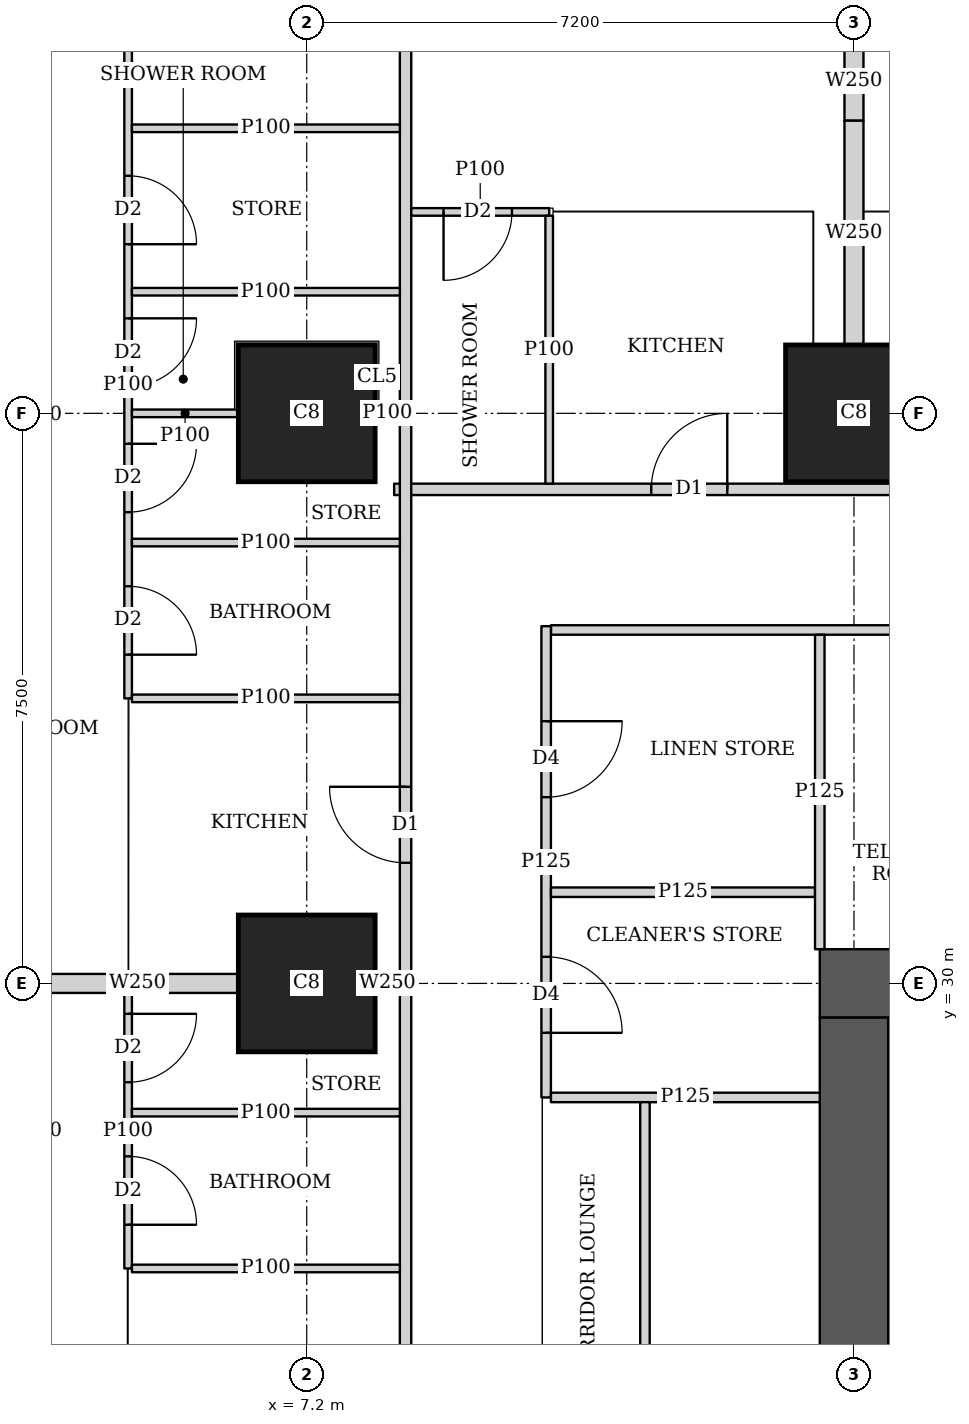
"""IFC4 building model, lengths in metres.
Left out: names, types, materials, properties, quantities, classifications, styles, units other than length and angle.
Written with IfcOpenShell. Run it as: python <this file> out.ifc"""

import sys

from ifc_helpers import new_model, si_unit, direction, frame, frame_2d, origin, origin_2d, place, context, subcontext, project, spatial, rectangle, extrude, element, fill, save


model = new_model("IFC4")
c1 = context("Model", 3, precision=1e-05, world=origin(), true_north=direction((0.0, 1.0)))
c2 = subcontext(c1, "Body", "Model", "MODEL_VIEW")
j1 = project(units=[si_unit("LENGTHUNIT", "METRE"), si_unit("PLANEANGLEUNIT", "RADIAN")], contexts=[c1])
p1 = place(None, origin())
s1 = spatial("IfcSite", under=j1, at=p1, CompositionType="ELEMENT")
p2 = place(p1, origin())
s2 = spatial("IfcBuilding", under=s1, at=p2, CompositionType="ELEMENT")
p3 = place(p2, frame((0.0, 0.0, 42.5)))
s3 = spatial("IfcBuildingStorey", under=s2, at=p3, CompositionType="ELEMENT", Elevation=42.5)
for number, where, z_axis, x_axis in (
    (1, (7.2, 30.0, 0.0), (0.0, 0.0, 1.0), (1.0, 0.0, 0.0)),
    (2, (7.2, 37.5, 0.0), (0.0, 0.0, 1.0), (1.0, 0.0, 0.0)),
    (3, (14.4, 37.5, 0.0), (0.0, 0.0, 1.0), (1.0, 0.0, 0.0)),
):
    element("IfcColumn", number, at=place(p3, frame(where, z_axis=z_axis, x_axis=x_axis)), inside=s3, PredefinedType="COLUMN", context=c2, shape_type="SweptSolid", body=[
        extrude(rectangle(XDim=1.8, YDim=1.8, at=origin_2d()), origin(), (0.0, 0.0, 1.0), 3.75),
    ])
p4 = place(p3, frame((13.95, 30.0, 0.0), z_axis=(0.0, 0.0, 1.0), x_axis=(1.0, 0.0, 0.0)))
e4 = element("IfcWall", 4, at=p4, inside=s3, PredefinedType="SHEAR", context=c2, shape_type="SweptSolid", body=[
    extrude(rectangle(XDim=15.3, YDim=0.9, at=frame_2d((7.65, 0.0))), origin(), (0.0, 0.0, 1.0), 3.75),
])
p5 = place(p4, frame((4.45, 0.0, 0.0)))
e5 = element("IfcOpeningElement", 5, at=p5, cuts=e4, PredefinedType="OPENING", context=c2, shape_type="SweptSolid", body=[
    extrude(rectangle(XDim=1.8, YDim=2.1, at=frame_2d((0.9, 1.05))), frame((0.0, 0.46, 0.0), z_axis=(0.0, -1.0, 0.0), x_axis=(1.0, 0.0, 0.0)), (0.0, 0.0, 1.0), 0.92),
])
p6 = place(p4, frame((10.7, 0.0, 0.0)))
e6 = element("IfcOpeningElement", 6, at=p6, cuts=e4, PredefinedType="OPENING", context=c2, shape_type="SweptSolid", body=[
    extrude(rectangle(XDim=1.1, YDim=2.1, at=frame_2d((0.55, 1.05))), frame((0.0, 0.46, 0.0), z_axis=(0.0, -1.0, 0.0), x_axis=(1.0, 0.0, 0.0)), (0.0, 0.0, 1.0), 0.92),
])
p7 = place(p3, frame((14.4, 15.45, 0.0), z_axis=(0.0, 0.0, 1.0), x_axis=(0.0, 1.0, 0.0)))
e7 = element("IfcWall", 7, at=p7, inside=s3, PredefinedType="SHEAR", context=c2, shape_type="SweptSolid", body=[
    extrude(rectangle(XDim=14.1, YDim=0.9, at=frame_2d((7.05, 0.0))), origin(), (0.0, 0.0, 1.0), 3.75),
])
p8 = place(p3, frame((8.5, 2.426, 0.0), z_axis=(0.0, 0.0, 1.0), x_axis=(0.0, 1.0, 0.0)))
e8 = element("IfcWall", 8, at=p8, inside=s3, PredefinedType="SOLIDWALL", context=c2, shape_type="SweptSolid", body=[
    extrude(rectangle(XDim=40.173, YDim=0.15, at=frame_2d((20.086, 0.0))), origin(), (0.0, 0.0, 1.0), 3.5),
])
p9 = place(p8, frame((9.986, 0.0, 0.0)))
e9 = element("IfcOpeningElement", 9, at=p9, cuts=e8, PredefinedType="OPENING", context=c2, shape_type="SweptSolid", body=[
    extrude(rectangle(XDim=1.0, YDim=2.1, at=frame_2d((0.5, 1.05))), frame((0.0, 0.085, 0.0), z_axis=(0.0, -1.0, 0.0), x_axis=(1.0, 0.0, 0.0)), (0.0, 0.0, 1.0), 0.17),
])
p10 = place(p8, frame((14.161, 0.0, 0.0)))
e10 = element("IfcOpeningElement", 10, at=p10, cuts=e8, PredefinedType="OPENING", context=c2, shape_type="SweptSolid", body=[
    extrude(rectangle(XDim=1.0, YDim=2.1, at=frame_2d((0.5, 1.05))), frame((0.0, 0.085, 0.0), z_axis=(0.0, -1.0, 0.0), x_axis=(1.0, 0.0, 0.0)), (0.0, 0.0, 1.0), 0.17),
])
p11 = place(p8, frame((21.662, 0.0, 0.0)))
e11 = element("IfcOpeningElement", 11, at=p11, cuts=e8, PredefinedType="OPENING", context=c2, shape_type="SweptSolid", body=[
    extrude(rectangle(XDim=1.0, YDim=2.1, at=frame_2d((0.5, 1.05))), frame((0.0, 0.085, 0.0), z_axis=(0.0, -1.0, 0.0), x_axis=(1.0, 0.0, 0.0)), (0.0, 0.0, 1.0), 0.17),
])
p12 = place(p8, frame((29.161, 0.0, 0.0)))
e12 = element("IfcOpeningElement", 12, at=p12, cuts=e8, PredefinedType="OPENING", context=c2, shape_type="SweptSolid", body=[
    extrude(rectangle(XDim=1.0, YDim=2.1, at=frame_2d((0.5, 1.05))), frame((0.0, 0.085, 0.0), z_axis=(0.0, -1.0, 0.0), x_axis=(1.0, 0.0, 0.0)), (0.0, 0.0, 1.0), 0.17),
])
p13 = place(p3, frame((8.35, 36.5, 0.0), z_axis=(0.0, 0.0, 1.0), x_axis=(1.0, 0.0, 0.0)))
e13 = element("IfcWall", 13, at=p13, inside=s3, PredefinedType="SOLIDWALL", context=c2, shape_type="SweptSolid", body=[
    extrude(rectangle(XDim=26.415, YDim=0.15, at=frame_2d((13.208, 0.0))), origin(), (0.0, 0.0, 1.0), 3.5),
])
p14 = place(p13, frame((3.383, 0.0, 0.0)))
e14 = element("IfcOpeningElement", 14, at=p14, cuts=e13, PredefinedType="OPENING", context=c2, shape_type="SweptSolid", body=[
    extrude(rectangle(XDim=1.0, YDim=2.1, at=frame_2d((0.5, 1.05))), frame((0.0, 0.085, 0.0), z_axis=(0.0, -1.0, 0.0), x_axis=(1.0, 0.0, 0.0)), (0.0, 0.0, 1.0), 0.17),
])
p15 = place(p13, frame((7.65, 0.0, 0.0)))
e15 = element("IfcOpeningElement", 15, at=p15, cuts=e13, PredefinedType="OPENING", context=c2, shape_type="SweptSolid", body=[
    extrude(rectangle(XDim=1.0, YDim=2.1, at=frame_2d((0.5, 1.05))), frame((0.0, 0.085, 0.0), z_axis=(0.0, -1.0, 0.0), x_axis=(1.0, 0.0, 0.0)), (0.0, 0.0, 1.0), 0.17),
])
p16 = place(p13, frame((14.85, 0.0, 0.0)))
e16 = element("IfcOpeningElement", 16, at=p16, cuts=e13, PredefinedType="OPENING", context=c2, shape_type="SweptSolid", body=[
    extrude(rectangle(XDim=1.0, YDim=2.1, at=frame_2d((0.5, 1.05))), frame((0.0, 0.085, 0.0), z_axis=(0.0, -1.0, 0.0), x_axis=(1.0, 0.0, 0.0)), (0.0, 0.0, 1.0), 0.17),
])
p17 = place(p13, frame((23.923, 0.0, 0.0)))
e17 = element("IfcOpeningElement", 17, at=p17, cuts=e13, PredefinedType="OPENING", context=c2, shape_type="SweptSolid", body=[
    extrude(rectangle(XDim=1.0, YDim=2.1, at=frame_2d((0.5, 1.05))), frame((0.0, 0.085, 0.0), z_axis=(0.0, -1.0, 0.0), x_axis=(1.0, 0.0, 0.0)), (0.0, 0.0, 1.0), 0.17),
])
p18 = place(p3, frame((4.85, 26.25, 0.0), z_axis=(0.0, 0.0, 1.0), x_axis=(0.0, 1.0, 0.0)))
e18 = element("IfcWall", 18, at=p18, inside=s3, PredefinedType="PARTITIONING", context=c2, shape_type="SweptSolid", body=[
    extrude(rectangle(XDim=3.625, YDim=0.1, at=frame_2d((1.812, 0.0))), origin(), (0.0, 0.0, 1.0), 3.5),
])
p19 = place(p18, frame((0.575, 0.0, 0.0)))
e19 = element("IfcOpeningElement", 19, at=p19, cuts=e18, PredefinedType="OPENING", context=c2, shape_type="SweptSolid", body=[
    extrude(rectangle(XDim=0.9, YDim=2.1, at=frame_2d((0.45, 1.05))), frame((0.0, 0.06, 0.0), z_axis=(0.0, -1.0, 0.0), x_axis=(1.0, 0.0, 0.0)), (0.0, 0.0, 1.0), 0.12),
])
p20 = place(p18, frame((2.45, 0.0, 0.0)))
e20 = element("IfcOpeningElement", 20, at=p20, cuts=e18, PredefinedType="OPENING", context=c2, shape_type="SweptSolid", body=[
    extrude(rectangle(XDim=0.9, YDim=2.1, at=frame_2d((0.45, 1.05))), frame((0.0, 0.06, 0.0), z_axis=(0.0, -1.0, 0.0), x_axis=(1.0, 0.0, 0.0)), (0.0, 0.0, 1.0), 0.12),
])
for number, where, z_axis, x_axis in (
    (21, (4.9, 26.25, 0.0), (0.0, 0.0, 1.0), (1.0, 0.0, 0.0)),
    (22, (4.9, 28.3, 0.0), (0.0, 0.0, 1.0), (1.0, 0.0, 0.0)),
):
    element("IfcWall", number, at=place(p3, frame(where, z_axis=z_axis, x_axis=x_axis)), inside=s3, PredefinedType="PARTITIONING", context=c2, shape_type="SweptSolid", body=[
        extrude(rectangle(XDim=3.525, YDim=0.1, at=frame_2d((1.763, 0.0))), origin(), (0.0, 0.0, 1.0), 3.5),
    ])
p21 = place(p3, frame((4.85, 33.75, 0.0), z_axis=(0.0, 0.0, 1.0), x_axis=(0.0, 1.0, 0.0)))
e23 = element("IfcWall", 23, at=p21, inside=s3, PredefinedType="PARTITIONING", context=c2, shape_type="SweptSolid", body=[
    extrude(rectangle(XDim=8.244, YDim=0.1, at=frame_2d((4.122, 0.0))), origin(), (0.0, 0.0, 1.0), 3.5),
])
p22 = place(p21, frame((0.575, 0.0, 0.0)))
e24 = element("IfcOpeningElement", 24, at=p22, cuts=e23, PredefinedType="OPENING", context=c2, shape_type="SweptSolid", body=[
    extrude(rectangle(XDim=0.9, YDim=2.1, at=frame_2d((0.45, 1.05))), frame((0.0, 0.06, 0.0), z_axis=(0.0, -1.0, 0.0), x_axis=(1.0, 0.0, 0.0)), (0.0, 0.0, 1.0), 0.12),
])
p23 = place(p21, frame((4.1, 0.0, 0.0)))
e25 = element("IfcOpeningElement", 25, at=p23, cuts=e23, PredefinedType="OPENING", context=c2, shape_type="SweptSolid", body=[
    extrude(rectangle(XDim=0.9, YDim=2.1, at=frame_2d((0.45, 1.05))), frame((0.0, 0.06, 0.0), z_axis=(0.0, -1.0, 0.0), x_axis=(1.0, 0.0, 0.0)), (0.0, 0.0, 1.0), 0.12),
])
p24 = place(p21, frame((2.45, 0.0, 0.0)))
e26 = element("IfcOpeningElement", 26, at=p24, cuts=e23, PredefinedType="OPENING", context=c2, shape_type="SweptSolid", body=[
    extrude(rectangle(XDim=0.9, YDim=2.1, at=frame_2d((0.45, 1.05))), frame((0.0, 0.06, 0.0), z_axis=(0.0, -1.0, 0.0), x_axis=(1.0, 0.0, 0.0)), (0.0, 0.0, 1.0), 0.12),
])
p25 = place(p21, frame((5.975, 0.0, 0.0)))
e27 = element("IfcOpeningElement", 27, at=p25, cuts=e23, PredefinedType="OPENING", context=c2, shape_type="SweptSolid", body=[
    extrude(rectangle(XDim=0.9, YDim=2.1, at=frame_2d((0.45, 1.05))), frame((0.0, 0.06, 0.0), z_axis=(0.0, -1.0, 0.0), x_axis=(1.0, 0.0, 0.0)), (0.0, 0.0, 1.0), 0.12),
])
p26 = place(p3, frame((4.85, 41.994, 0.0), z_axis=(0.0, 0.0, 1.0), x_axis=(0.0, 1.0, 0.0)))
e28 = element("IfcWall", 28, at=p26, inside=s3, PredefinedType="PARTITIONING", context=c2, shape_type="SweptSolid", body=[
    extrude(rectangle(XDim=2.901, YDim=0.1, at=frame_2d((1.451, 0.0))), origin(), (0.0, 0.0, 1.0), 2.05),
])
p27 = place(p3, frame((4.9, 33.75, 0.0), z_axis=(0.0, 0.0, 1.0), x_axis=(1.0, 0.0, 0.0)))
e29 = element("IfcWall", 29, at=p27, inside=s3, PredefinedType="PARTITIONING", context=c2, shape_type="SweptSolid", body=[
    extrude(rectangle(XDim=3.525, YDim=0.1, at=frame_2d((1.763, 0.0))), origin(), (0.0, 0.0, 1.0), 3.5),
])
p28 = place(p3, frame((4.9, 37.5, 0.0), z_axis=(0.0, 0.0, 1.0), x_axis=(1.0, 0.0, 0.0)))
e30 = element("IfcWall", 30, at=p28, inside=s3, PredefinedType="PARTITIONING", context=c2, shape_type="SweptSolid", body=[
    extrude(rectangle(XDim=1.399, YDim=0.1, at=frame_2d((0.7, 0.0))), origin(), (0.0, 0.0, 1.0), 3.5),
])
p29 = place(p3, frame((8.101, 37.5, 0.0), z_axis=(0.0, 0.0, 1.0), x_axis=(1.0, 0.0, 0.0)))
e31 = element("IfcWall", 31, at=p29, inside=s3, PredefinedType="PARTITIONING", context=c2, shape_type="SweptSolid", body=[
    extrude(rectangle(XDim=0.324, YDim=0.1, at=frame_2d((0.162, 0.0))), origin(), (0.0, 0.0, 1.0), 3.5),
])
for number, where, z_axis, x_axis in (
    (32, (4.9, 41.25, 0.0), (0.0, 0.0, 1.0), (1.0, 0.0, 0.0)),
    (33, (4.9, 35.8, 0.0), (0.0, 0.0, 1.0), (1.0, 0.0, 0.0)),
    (34, (4.9, 39.1, 0.0), (0.0, 0.0, 1.0), (1.0, 0.0, 0.0)),
):
    element("IfcWall", number, at=place(p3, frame(where, z_axis=z_axis, x_axis=x_axis)), inside=s3, PredefinedType="PARTITIONING", context=c2, shape_type="SweptSolid", body=[
        extrude(rectangle(XDim=3.525, YDim=0.1, at=frame_2d((1.763, 0.0))), origin(), (0.0, 0.0, 1.0), 3.5),
    ])
p30 = place(p3, frame((3.65, 30.0, 0.0), z_axis=(0.0, 0.0, 1.0), x_axis=(1.0, 0.0, 0.0)))
e35 = element("IfcWall", 35, at=p30, inside=s3, PredefinedType="SOLIDWALL", context=c2, shape_type="SweptSolid", body=[
    extrude(rectangle(XDim=2.649, YDim=0.25, at=frame_2d((1.325, 0.0))), origin(), (0.0, 0.0, 1.0), 3.5),
])
p31 = place(p3, frame((8.101, 30.0, 0.0), z_axis=(0.0, 0.0, 1.0), x_axis=(1.0, 0.0, 0.0)))
e36 = element("IfcWall", 36, at=p31, inside=s3, PredefinedType="SOLIDWALL", context=c2, shape_type="SweptSolid", body=[
    extrude(rectangle(XDim=0.324, YDim=0.25, at=frame_2d((0.162, 0.0))), origin(), (0.0, 0.0, 1.0), 3.5),
])
p32 = place(p3, frame((8.575, 40.15, 0.0), z_axis=(0.0, 0.0, 1.0), x_axis=(1.0, 0.0, 0.0)))
e37 = element("IfcWall", 37, at=p32, inside=s3, PredefinedType="PARTITIONING", context=c2, shape_type="SweptSolid", body=[
    extrude(rectangle(XDim=1.815, YDim=0.1, at=frame_2d((0.907, 0.0))), origin(), (0.0, 0.0, 1.0), 3.5),
])
p33 = place(p32, frame((0.425, 0.0, 0.0)))
e38 = element("IfcOpeningElement", 38, at=p33, cuts=e37, PredefinedType="OPENING", context=c2, shape_type="SweptSolid", body=[
    extrude(rectangle(XDim=0.9, YDim=2.1, at=frame_2d((0.45, 1.05))), frame((0.0, 0.06, 0.0), z_axis=(0.0, -1.0, 0.0), x_axis=(1.0, 0.0, 0.0)), (0.0, 0.0, 1.0), 0.12),
])
p34 = place(p3, frame((10.39, 36.575, 0.0), z_axis=(0.0, 0.0, 1.0), x_axis=(0.0, 1.0, 0.0)))
e39 = element("IfcWall", 39, at=p34, inside=s3, PredefinedType="PARTITIONING", context=c2, shape_type="SweptSolid", body=[
    extrude(rectangle(XDim=3.525, YDim=0.1, at=frame_2d((1.763, 0.0))), origin(), (0.0, 0.0, 1.0), 3.5),
])
p35 = place(p3, frame((14.4, 41.35, 0.0), z_axis=(0.0, 0.0, 1.0), x_axis=(0.0, 1.0, 0.0)))
e40 = element("IfcWall", 40, at=p35, inside=s3, PredefinedType="SOLIDWALL", context=c2, shape_type="SweptSolid", body=[
    extrude(rectangle(XDim=1.049, YDim=0.25, at=frame_2d((0.524, 0.0))), origin(), (0.0, 0.0, 1.0), 3.5),
])
p36 = place(p3, frame((14.4, 38.401, 0.0), z_axis=(0.0, 0.0, 1.0), x_axis=(0.0, 1.0, 0.0)))
e41 = element("IfcWall", 41, at=p36, inside=s3, PredefinedType="SOLIDWALL", context=c2, shape_type="SweptSolid", body=[
    extrude(rectangle(XDim=2.949, YDim=0.25, at=frame_2d((1.475, 0.0))), origin(), (0.0, 0.0, 1.0), 3.5),
])
p37 = place(p3, frame((10.35, 28.5, 0.0), z_axis=(0.0, 0.0, 1.0), x_axis=(0.0, 1.0, 0.0)))
e42 = element("IfcWall", 42, at=p37, inside=s3, PredefinedType="PARTITIONING", context=c2, shape_type="SweptSolid", body=[
    extrude(rectangle(XDim=6.2, YDim=0.125, at=frame_2d((3.1, 0.0))), origin(), (0.0, 0.0, 1.0), 3.5),
])
p38 = place(p37, frame((0.85, 0.0, 0.0)))
e43 = element("IfcOpeningElement", 43, at=p38, cuts=e42, PredefinedType="OPENING", context=c2, shape_type="SweptSolid", body=[
    extrude(rectangle(XDim=1.0, YDim=2.1, at=frame_2d((0.5, 1.05))), frame((0.0, 0.073, 0.0), z_axis=(0.0, -1.0, 0.0), x_axis=(1.0, 0.0, 0.0)), (0.0, 0.0, 1.0), 0.145),
])
p39 = place(p37, frame((3.95, 0.0, 0.0)))
e44 = element("IfcOpeningElement", 44, at=p39, cuts=e42, PredefinedType="OPENING", context=c2, shape_type="SweptSolid", body=[
    extrude(rectangle(XDim=1.0, YDim=2.1, at=frame_2d((0.5, 1.05))), frame((0.0, 0.073, 0.0), z_axis=(0.0, -1.0, 0.0), x_axis=(1.0, 0.0, 0.0)), (0.0, 0.0, 1.0), 0.145),
])
p40 = place(p3, frame((11.65, 19.562, 0.0), z_axis=(0.0, 0.0, 1.0), x_axis=(0.0, 1.0, 0.0)))
e45 = element("IfcWall", 45, at=p40, inside=s3, PredefinedType="PARTITIONING", context=c2, shape_type="SweptSolid", body=[
    extrude(rectangle(XDim=8.876, YDim=0.125, at=frame_2d((4.438, 0.0))), origin(), (0.0, 0.0, 1.0), 3.5),
])
p41 = place(p40, frame((3.938, 0.0, 0.0)))
e46 = element("IfcOpeningElement", 46, at=p41, cuts=e45, PredefinedType="OPENING", context=c2, shape_type="SweptSolid", body=[
    extrude(rectangle(XDim=1.0, YDim=2.1, at=frame_2d((0.5, 1.05))), frame((0.0, 0.073, 0.0), z_axis=(0.0, -1.0, 0.0), x_axis=(1.0, 0.0, 0.0)), (0.0, 0.0, 1.0), 0.145),
])
p42 = place(p3, frame((10.413, 28.5, 0.0), z_axis=(0.0, 0.0, 1.0), x_axis=(1.0, 0.0, 0.0)))
e47 = element("IfcWall", 47, at=p42, inside=s3, PredefinedType="PARTITIONING", context=c2, shape_type="SweptSolid", body=[
    extrude(rectangle(XDim=3.537, YDim=0.125, at=frame_2d((1.769, 0.0))), origin(), (0.0, 0.0, 1.0), 3.5),
])
p43 = place(p3, frame((10.413, 31.2, 0.0), z_axis=(0.0, 0.0, 1.0), x_axis=(1.0, 0.0, 0.0)))
e48 = element("IfcWall", 48, at=p43, inside=s3, PredefinedType="PARTITIONING", context=c2, shape_type="SweptSolid", body=[
    extrude(rectangle(XDim=3.475, YDim=0.125, at=frame_2d((1.737, 0.0))), origin(), (0.0, 0.0, 1.0), 3.5),
])
p44 = place(p3, frame((13.95, 30.45, 0.0), z_axis=(0.0, 0.0, 1.0), x_axis=(0.0, 1.0, 0.0)))
e49 = element("IfcWall", 49, at=p44, inside=s3, PredefinedType="PARTITIONING", context=c2, shape_type="SweptSolid", body=[
    extrude(rectangle(XDim=4.137, YDim=0.125, at=frame_2d((2.068, 0.0))), origin(), (0.0, 0.0, 1.0), 3.5),
])
p45 = place(p3, frame((10.413, 34.65, 0.0), z_axis=(0.0, 0.0, 1.0), x_axis=(1.0, 0.0, 0.0)))
e50 = element("IfcWall", 50, at=p45, inside=s3, PredefinedType="PARTITIONING", context=c2, shape_type="SweptSolid", body=[
    extrude(rectangle(XDim=10.837, YDim=0.125, at=frame_2d((5.418, 0.0))), origin(), (0.0, 0.0, 1.0), 3.5),
])
p46 = place(p45, frame((7.487, 0.0, 0.0)))
e51 = element("IfcOpeningElement", 51, at=p46, cuts=e50, PredefinedType="OPENING", context=c2, shape_type="SweptSolid", body=[
    extrude(rectangle(XDim=1.8, YDim=2.1, at=frame_2d((0.9, 1.05))), frame((0.0, 0.073, 0.0), z_axis=(0.0, -1.0, 0.0), x_axis=(1.0, 0.0, 0.0)), (0.0, 0.0, 1.0), 0.145),
])
p47 = place(p3, frame((14.85, 26.25, 0.0), z_axis=(0.0, 0.0, 1.0), x_axis=(1.0, 0.0, 0.0)))
e52 = element("IfcWall", 52, at=p47, inside=s3, PredefinedType="SOLIDWALL", context=c2, shape_type="SweptSolid", body=[
    extrude(rectangle(XDim=1.95, YDim=0.2, at=frame_2d((0.975, 0.0))), origin(), (0.0, 0.0, 1.0), 3.5),
])
p48 = place(p19, origin())
e53 = element("IfcDoor", 53, at=p48, inside=s3, OperationType="SINGLE_SWING_RIGHT", PredefinedType="DOOR", context=c2, shape_type="SweptSolid", body=[
    extrude(rectangle(XDim=0.9, YDim=2.1, at=frame_2d((0.45, 1.05))), frame((0.0, 0.025, 0.0), z_axis=(0.0, -1.0, 0.0), x_axis=(1.0, 0.0, 0.0)), (0.0, 0.0, 1.0), 0.05),
])
fill(e19, e53)
p49 = place(p20, origin())
e54 = element("IfcDoor", 54, at=p49, inside=s3, OperationType="SINGLE_SWING_LEFT", PredefinedType="DOOR", context=c2, shape_type="SweptSolid", body=[
    extrude(rectangle(XDim=0.9, YDim=2.1, at=frame_2d((0.45, 1.05))), frame((0.0, 0.025, 0.0), z_axis=(0.0, -1.0, 0.0), x_axis=(1.0, 0.0, 0.0)), (0.0, 0.0, 1.0), 0.05),
])
fill(e20, e54)
p50 = place(p22, origin())
e55 = element("IfcDoor", 55, at=p50, inside=s3, OperationType="SINGLE_SWING_RIGHT", PredefinedType="DOOR", context=c2, shape_type="SweptSolid", body=[
    extrude(rectangle(XDim=0.9, YDim=2.1, at=frame_2d((0.45, 1.05))), frame((0.0, 0.025, 0.0), z_axis=(0.0, -1.0, 0.0), x_axis=(1.0, 0.0, 0.0)), (0.0, 0.0, 1.0), 0.05),
])
fill(e24, e55)
p51 = place(p23, origin())
e56 = element("IfcDoor", 56, at=p51, inside=s3, OperationType="SINGLE_SWING_LEFT", PredefinedType="DOOR", context=c2, shape_type="SweptSolid", body=[
    extrude(rectangle(XDim=0.9, YDim=2.1, at=frame_2d((0.45, 1.05))), frame((0.0, 0.025, 0.0), z_axis=(0.0, -1.0, 0.0), x_axis=(1.0, 0.0, 0.0)), (0.0, 0.0, 1.0), 0.05),
])
fill(e25, e56)
p52 = place(p24, origin())
e57 = element("IfcDoor", 57, at=p52, inside=s3, OperationType="SINGLE_SWING_LEFT", PredefinedType="DOOR", context=c2, shape_type="SweptSolid", body=[
    extrude(rectangle(XDim=0.9, YDim=2.1, at=frame_2d((0.45, 1.05))), frame((0.0, 0.025, 0.0), z_axis=(0.0, -1.0, 0.0), x_axis=(1.0, 0.0, 0.0)), (0.0, 0.0, 1.0), 0.05),
])
fill(e26, e57)
p53 = place(p25, origin())
e58 = element("IfcDoor", 58, at=p53, inside=s3, OperationType="SINGLE_SWING_RIGHT", PredefinedType="DOOR", context=c2, shape_type="SweptSolid", body=[
    extrude(rectangle(XDim=0.9, YDim=2.1, at=frame_2d((0.45, 1.05))), frame((0.0, 0.025, 0.0), z_axis=(0.0, -1.0, 0.0), x_axis=(1.0, 0.0, 0.0)), (0.0, 0.0, 1.0), 0.05),
])
fill(e27, e58)
p54 = place(p12, origin())
e59 = element("IfcDoor", 59, at=p54, inside=s3, OperationType="SINGLE_SWING_RIGHT", PredefinedType="DOOR", context=c2, shape_type="SweptSolid", body=[
    extrude(rectangle(XDim=1.0, YDim=2.1, at=frame_2d((0.5, 1.05))), frame((0.0, 0.025, 0.0), z_axis=(0.0, -1.0, 0.0), x_axis=(1.0, 0.0, 0.0)), (0.0, 0.0, 1.0), 0.05),
])
fill(e12, e59)
p55 = place(p33, origin())
e60 = element("IfcDoor", 60, at=p55, inside=s3, OperationType="SINGLE_SWING_RIGHT", PredefinedType="DOOR", context=c2, shape_type="SweptSolid", body=[
    extrude(rectangle(XDim=0.9, YDim=2.1, at=frame_2d((0.45, 1.05))), frame((0.0, 0.025, 0.0), z_axis=(0.0, -1.0, 0.0), x_axis=(1.0, 0.0, 0.0)), (0.0, 0.0, 1.0), 0.05),
])
fill(e38, e60)
p56 = place(p14, origin())
e61 = element("IfcDoor", 61, at=p56, inside=s3, OperationType="SINGLE_SWING_RIGHT", PredefinedType="DOOR", context=c2, shape_type="SweptSolid", body=[
    extrude(rectangle(XDim=1.0, YDim=2.1, at=frame_2d((0.5, 1.05))), frame((0.0, 0.025, 0.0), z_axis=(0.0, -1.0, 0.0), x_axis=(1.0, 0.0, 0.0)), (0.0, 0.0, 1.0), 0.05),
])
fill(e14, e61)
p57 = place(p38, origin())
e62 = element("IfcDoor", 62, at=p57, inside=s3, OperationType="SINGLE_SWING_RIGHT", PredefinedType="DOOR", context=c2, shape_type="SweptSolid", body=[
    extrude(rectangle(XDim=1.0, YDim=2.1, at=frame_2d((0.5, 1.05))), frame((0.0, 0.025, 0.0), z_axis=(0.0, -1.0, 0.0), x_axis=(1.0, 0.0, 0.0)), (0.0, 0.0, 1.0), 0.05),
])
fill(e43, e62)
p58 = place(p39, origin())
e63 = element("IfcDoor", 63, at=p58, inside=s3, OperationType="SINGLE_SWING_LEFT", PredefinedType="DOOR", context=c2, shape_type="SweptSolid", body=[
    extrude(rectangle(XDim=1.0, YDim=2.1, at=frame_2d((0.5, 1.05))), frame((0.0, 0.025, 0.0), z_axis=(0.0, -1.0, 0.0), x_axis=(1.0, 0.0, 0.0)), (0.0, 0.0, 1.0), 0.05),
])
fill(e44, e63)
save(model, sys.argv[1])
